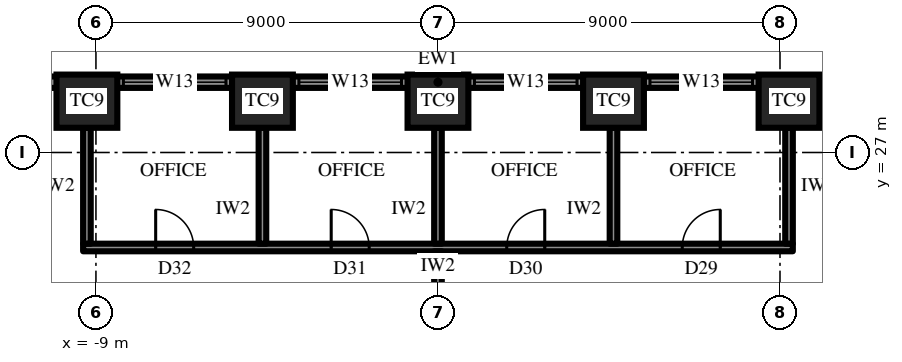
"""IFC4 building model, lengths in metres.
Left out: names, types, materials, properties, quantities, classifications, styles, units other than length and angle.
Written with IfcOpenShell. Run it as: python <this file> out.ifc"""

import sys

from ifc_helpers import new_model, si_unit, direction, frame, frame_2d, origin, origin_2d, place, context, subcontext, project, spatial, rectangle, extrude, element, fill, save


model = new_model("IFC4")
c1 = context("Model", 3, precision=1e-05, world=origin(), true_north=direction((0.0, 1.0)))
c2 = subcontext(c1, "Body", "Model", "MODEL_VIEW")
j1 = project(units=[si_unit("LENGTHUNIT", "METRE"), si_unit("PLANEANGLEUNIT", "RADIAN")], contexts=[c1])
p1 = place(None, origin())
s1 = spatial("IfcSite", under=j1, at=p1, CompositionType="ELEMENT")
p2 = place(p1, origin())
s2 = spatial("IfcBuilding", under=s1, at=p2, CompositionType="ELEMENT")
p3 = place(p2, frame((0.0, 0.0, 223.9)))
s3 = spatial("IfcBuildingStorey", under=s2, at=p3, CompositionType="ELEMENT", Elevation=223.9)
for number, where, z_axis, x_axis in (
    (1, (9.238, 28.35, 0.0), (0.0, 0.0, 1.0), (-1.0, 0.0, 0.0)),
    (2, (4.619, 28.35, 0.0), (0.0, 0.0, 1.0), (-1.0, 0.0, 0.0)),
    (3, (0.0, 28.35, 0.0), (0.0, 0.0, 1.0), (-1.0, 0.0, 0.0)),
    (4, (-4.619, 28.35, 0.0), (0.0, 0.0, 1.0), (-1.0, 0.0, 0.0)),
    (5, (-9.238, 28.35, 0.0), (0.0, 0.0, 1.0), (-1.0, 0.0, 0.0)),
):
    element("IfcColumn", number, at=place(p3, frame(where, z_axis=z_axis, x_axis=x_axis)), inside=s3, PredefinedType="COLUMN", context=c2, shape_type="SweptSolid", body=[
        extrude(rectangle(XDim=1.6, YDim=1.4, at=origin_2d()), origin(), (0.0, 0.0, 1.0), 4.2),
    ])
p4 = place(p3, frame((13.856, 28.85, 0.0), z_axis=(0.0, 0.0, 1.0), x_axis=(-1.0, 0.0, 0.0)))
e6 = element("IfcWall", 6, at=p4, inside=s3, PredefinedType="SOLIDWALL", context=c2, shape_type="SweptSolid", body=[
    extrude(rectangle(XDim=27.713, YDim=0.3, at=frame_2d((13.856, 0.0))), origin(), (0.0, 0.0, 1.0), 2.0),
])
p5 = place(p4, frame((0.959, 0.0, 0.6)))
e7 = element("IfcOpeningElement", 7, at=p5, cuts=e6, PredefinedType="OPENING", context=c2, shape_type="SweptSolid", body=[
    extrude(rectangle(XDim=2.7, YDim=1.15, at=frame_2d((1.35, 0.575))), frame((0.0, 0.16, 0.0), z_axis=(0.0, -1.0, 0.0), x_axis=(1.0, 0.0, 0.0)), (0.0, 0.0, 1.0), 0.32),
])
p6 = place(p4, frame((5.578, 0.0, 0.6)))
e8 = element("IfcOpeningElement", 8, at=p6, cuts=e6, PredefinedType="OPENING", context=c2, shape_type="SweptSolid", body=[
    extrude(rectangle(XDim=2.7, YDim=1.15, at=frame_2d((1.35, 0.575))), frame((0.0, 0.16, 0.0), z_axis=(0.0, -1.0, 0.0), x_axis=(1.0, 0.0, 0.0)), (0.0, 0.0, 1.0), 0.32),
])
p7 = place(p4, frame((10.197, 0.0, 0.6)))
e9 = element("IfcOpeningElement", 9, at=p7, cuts=e6, PredefinedType="OPENING", context=c2, shape_type="SweptSolid", body=[
    extrude(rectangle(XDim=2.7, YDim=1.15, at=frame_2d((1.35, 0.575))), frame((0.0, 0.16, 0.0), z_axis=(0.0, -1.0, 0.0), x_axis=(1.0, 0.0, 0.0)), (0.0, 0.0, 1.0), 0.32),
])
p8 = place(p4, frame((14.816, 0.0, 0.6)))
e10 = element("IfcOpeningElement", 10, at=p8, cuts=e6, PredefinedType="OPENING", context=c2, shape_type="SweptSolid", body=[
    extrude(rectangle(XDim=2.7, YDim=1.15, at=frame_2d((1.35, 0.575))), frame((0.0, 0.16, 0.0), z_axis=(0.0, -1.0, 0.0), x_axis=(1.0, 0.0, 0.0)), (0.0, 0.0, 1.0), 0.32),
])
p9 = place(p4, frame((19.435, 0.0, 0.6)))
e11 = element("IfcOpeningElement", 11, at=p9, cuts=e6, PredefinedType="OPENING", context=c2, shape_type="SweptSolid", body=[
    extrude(rectangle(XDim=2.7, YDim=1.15, at=frame_2d((1.35, 0.575))), frame((0.0, 0.16, 0.0), z_axis=(0.0, -1.0, 0.0), x_axis=(1.0, 0.0, 0.0)), (0.0, 0.0, 1.0), 0.32),
])
p10 = place(p4, frame((24.053, 0.0, 0.6)))
e12 = element("IfcOpeningElement", 12, at=p10, cuts=e6, PredefinedType="OPENING", context=c2, shape_type="SweptSolid", body=[
    extrude(rectangle(XDim=2.7, YDim=1.15, at=frame_2d((1.35, 0.575))), frame((0.0, 0.16, 0.0), z_axis=(0.0, -1.0, 0.0), x_axis=(1.0, 0.0, 0.0)), (0.0, 0.0, 1.0), 0.32),
])
p11 = place(p3, frame((9.338, 24.5, 0.0), z_axis=(0.0, 0.0, 1.0), x_axis=(-1.0, 0.0, 0.0)))
e13 = element("IfcWall", 13, at=p11, inside=s3, PredefinedType="PARTITIONING", context=c2, shape_type="SweptSolid", body=[
    extrude(rectangle(XDim=18.675, YDim=0.2, at=frame_2d((9.338, 0.0))), origin(), (0.0, 0.0, 1.0), 4.0),
])
p12 = place(p11, frame((1.909, 0.0, 0.0)))
e14 = element("IfcOpeningElement", 14, at=p12, cuts=e13, PredefinedType="OPENING", context=c2, shape_type="SweptSolid", body=[
    extrude(rectangle(XDim=1.0, YDim=2.2, at=frame_2d((0.5, 1.1))), frame((0.0, 0.11, 0.0), z_axis=(0.0, -1.0, 0.0), x_axis=(1.0, 0.0, 0.0)), (0.0, 0.0, 1.0), 0.22),
])
p13 = place(p11, frame((6.528, 0.0, 0.0)))
e15 = element("IfcOpeningElement", 15, at=p13, cuts=e13, PredefinedType="OPENING", context=c2, shape_type="SweptSolid", body=[
    extrude(rectangle(XDim=1.0, YDim=2.2, at=frame_2d((0.5, 1.1))), frame((0.0, 0.11, 0.0), z_axis=(0.0, -1.0, 0.0), x_axis=(1.0, 0.0, 0.0)), (0.0, 0.0, 1.0), 0.22),
])
p14 = place(p11, frame((11.147, 0.0, 0.0)))
e16 = element("IfcOpeningElement", 16, at=p14, cuts=e13, PredefinedType="OPENING", context=c2, shape_type="SweptSolid", body=[
    extrude(rectangle(XDim=1.0, YDim=2.2, at=frame_2d((0.5, 1.1))), frame((0.0, 0.11, 0.0), z_axis=(0.0, -1.0, 0.0), x_axis=(1.0, 0.0, 0.0)), (0.0, 0.0, 1.0), 0.22),
])
p15 = place(p11, frame((15.766, 0.0, 0.0)))
e17 = element("IfcOpeningElement", 17, at=p15, cuts=e13, PredefinedType="OPENING", context=c2, shape_type="SweptSolid", body=[
    extrude(rectangle(XDim=1.0, YDim=2.2, at=frame_2d((0.5, 1.1))), frame((0.0, 0.11, 0.0), z_axis=(0.0, -1.0, 0.0), x_axis=(1.0, 0.0, 0.0)), (0.0, 0.0, 1.0), 0.22),
])
for number, where, z_axis, x_axis in (
    (18, (9.238, 24.6, 0.0), (0.0, 0.0, 1.0), (0.0, 1.0, 0.0)),
    (19, (4.619, 24.6, 0.0), (0.0, 0.0, 1.0), (0.0, 1.0, 0.0)),
    (20, (0.0, 24.6, 0.0), (0.0, 0.0, 1.0), (0.0, 1.0, 0.0)),
    (21, (-4.619, 24.6, 0.0), (0.0, 0.0, 1.0), (0.0, 1.0, 0.0)),
    (22, (-9.238, 24.6, 0.0), (0.0, 0.0, 1.0), (0.0, 1.0, 0.0)),
):
    element("IfcWall", number, at=place(p3, frame(where, z_axis=z_axis, x_axis=x_axis)), inside=s3, PredefinedType="PARTITIONING", context=c2, shape_type="SweptSolid", body=[
        extrude(rectangle(XDim=3.05, YDim=0.2, at=frame_2d((1.525, 0.0))), origin(), (0.0, 0.0, 1.0), 2.992),
    ])
p16 = place(p3, frame((0.0, 19.2, 0.0), z_axis=(0.0, 0.0, 1.0), x_axis=(0.0, 1.0, 0.0)))
e23 = element("IfcWall", 23, at=p16, inside=s3, PredefinedType="PARTITIONING", context=c2, shape_type="SweptSolid", body=[
    extrude(rectangle(XDim=5.2, YDim=0.2, at=frame_2d((2.6, 0.0))), origin(), (0.0, 0.0, 1.0), 2.992),
])
p17 = place(p6, origin())
e24 = element("IfcWindow", 24, at=p17, inside=s3, PartitioningType="SINGLE_PANEL", PredefinedType="WINDOW", context=c2, shape_type="SweptSolid", body=[
    extrude(rectangle(XDim=2.7, YDim=1.15, at=frame_2d((1.35, 0.575))), frame((0.0, 0.03, 0.0), z_axis=(0.0, -1.0, 0.0), x_axis=(1.0, 0.0, 0.0)), (0.0, 0.0, 1.0), 0.06),
])
fill(e8, e24)
p18 = place(p7, origin())
e25 = element("IfcWindow", 25, at=p18, inside=s3, PartitioningType="SINGLE_PANEL", PredefinedType="WINDOW", context=c2, shape_type="SweptSolid", body=[
    extrude(rectangle(XDim=2.7, YDim=1.15, at=frame_2d((1.35, 0.575))), frame((0.0, 0.03, 0.0), z_axis=(0.0, -1.0, 0.0), x_axis=(1.0, 0.0, 0.0)), (0.0, 0.0, 1.0), 0.06),
])
fill(e9, e25)
p19 = place(p8, origin())
e26 = element("IfcWindow", 26, at=p19, inside=s3, PartitioningType="SINGLE_PANEL", PredefinedType="WINDOW", context=c2, shape_type="SweptSolid", body=[
    extrude(rectangle(XDim=2.7, YDim=1.15, at=frame_2d((1.35, 0.575))), frame((0.0, 0.03, 0.0), z_axis=(0.0, -1.0, 0.0), x_axis=(1.0, 0.0, 0.0)), (0.0, 0.0, 1.0), 0.06),
])
fill(e10, e26)
p20 = place(p9, origin())
e27 = element("IfcWindow", 27, at=p20, inside=s3, PartitioningType="SINGLE_PANEL", PredefinedType="WINDOW", context=c2, shape_type="SweptSolid", body=[
    extrude(rectangle(XDim=2.7, YDim=1.15, at=frame_2d((1.35, 0.575))), frame((0.0, 0.03, 0.0), z_axis=(0.0, -1.0, 0.0), x_axis=(1.0, 0.0, 0.0)), (0.0, 0.0, 1.0), 0.06),
])
fill(e11, e27)
p21 = place(p12, frame((1.0, 0.0, 0.0), z_axis=(0.0, 0.0, 1.0), x_axis=(-1.0, 0.0, 0.0)))
e28 = element("IfcDoor", 28, at=p21, inside=s3, OperationType="SINGLE_SWING_LEFT", PredefinedType="DOOR", context=c2, shape_type="SweptSolid", body=[
    extrude(rectangle(XDim=1.0, YDim=2.2, at=frame_2d((0.5, 1.1))), frame((0.0, 0.025, 0.0), z_axis=(0.0, -1.0, 0.0), x_axis=(1.0, 0.0, 0.0)), (0.0, 0.0, 1.0), 0.05),
])
fill(e14, e28)
p22 = place(p13, frame((1.0, 0.0, 0.0), z_axis=(0.0, 0.0, 1.0), x_axis=(-1.0, 0.0, 0.0)))
e29 = element("IfcDoor", 29, at=p22, inside=s3, OperationType="SINGLE_SWING_LEFT", PredefinedType="DOOR", context=c2, shape_type="SweptSolid", body=[
    extrude(rectangle(XDim=1.0, YDim=2.2, at=frame_2d((0.5, 1.1))), frame((0.0, 0.025, 0.0), z_axis=(0.0, -1.0, 0.0), x_axis=(1.0, 0.0, 0.0)), (0.0, 0.0, 1.0), 0.05),
])
fill(e15, e29)
p23 = place(p14, frame((1.0, 0.0, 0.0), z_axis=(0.0, 0.0, 1.0), x_axis=(-1.0, 0.0, 0.0)))
e30 = element("IfcDoor", 30, at=p23, inside=s3, OperationType="SINGLE_SWING_RIGHT", PredefinedType="DOOR", context=c2, shape_type="SweptSolid", body=[
    extrude(rectangle(XDim=1.0, YDim=2.2, at=frame_2d((0.5, 1.1))), frame((0.0, 0.025, 0.0), z_axis=(0.0, -1.0, 0.0), x_axis=(1.0, 0.0, 0.0)), (0.0, 0.0, 1.0), 0.05),
])
fill(e16, e30)
p24 = place(p15, frame((1.0, 0.0, 0.0), z_axis=(0.0, 0.0, 1.0), x_axis=(-1.0, 0.0, 0.0)))
e31 = element("IfcDoor", 31, at=p24, inside=s3, OperationType="SINGLE_SWING_RIGHT", PredefinedType="DOOR", context=c2, shape_type="SweptSolid", body=[
    extrude(rectangle(XDim=1.0, YDim=2.2, at=frame_2d((0.5, 1.1))), frame((0.0, 0.025, 0.0), z_axis=(0.0, -1.0, 0.0), x_axis=(1.0, 0.0, 0.0)), (0.0, 0.0, 1.0), 0.05),
])
fill(e17, e31)
save(model, sys.argv[1])
